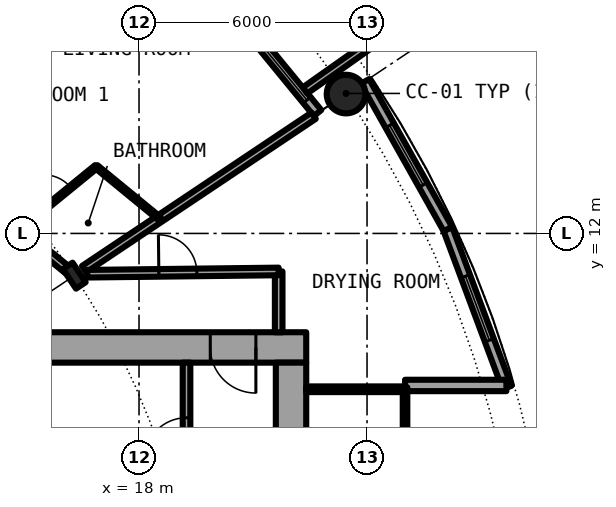
"""IFC4 building model, lengths in metres.
Left out: names, types, materials, properties, quantities, classifications, styles, units other than length and angle.
Written with IfcOpenShell. Run it as: python <this file> out.ifc"""

import sys

from ifc_helpers import new_model, si_unit, direction, frame, frame_2d, origin, origin_2d, place, context, subcontext, project, spatial, rectangle, hollow_circle, i_section, extrude, element, fill, save


model = new_model("IFC4")
c1 = context("Model", 3, precision=1e-05, world=origin(), true_north=direction((0.0, 1.0)))
c2 = subcontext(c1, "Body", "Model", "MODEL_VIEW")
j1 = project(units=[si_unit("LENGTHUNIT", "METRE"), si_unit("PLANEANGLEUNIT", "RADIAN")], contexts=[c1])
p1 = place(None, origin())
s1 = spatial("IfcSite", under=j1, at=p1, CompositionType="ELEMENT")
p2 = place(p1, origin())
s2 = spatial("IfcBuilding", under=s1, at=p2, CompositionType="ELEMENT")
p3 = place(p2, frame((0.0, 0.0, 47.2)))
s3 = spatial("IfcBuildingStorey", under=s2, at=p3, CompositionType="ELEMENT", Elevation=47.2)
p4 = place(p3, frame((23.448, 15.667, 0.0), z_axis=(0.0, 0.0, 1.0), x_axis=(1.0, 0.0, 0.0)))
e1 = element("IfcColumn", 1, at=p4, inside=s3, PredefinedType="COLUMN", context=c2, shape_type="SweptSolid", body=[
    extrude(hollow_circle(Radius=0.508, WallThickness=0.05, at=origin_2d()), origin(), (0.0, 0.0, 1.0), 3.05),
])
p5 = place(p3, frame((16.297, 10.889, 0.0), z_axis=(0.0, 0.0, 1.0), x_axis=(0.831469612303, 0.55557023302, 0.0)))
e2 = element("IfcColumn", 2, at=p5, inside=s3, PredefinedType="COLUMN", context=c2, shape_type="SweptSolid", body=[
    extrude(i_section(OverallWidth=0.305, OverallDepth=0.62, WebThickness=0.021, FlangeThickness=0.04, FilletRadius=0.027, at=origin_2d()), origin(), (0.0, 0.0, 1.0), 3.05),
])
p6 = place(p3, frame((22.699, 15.167, 0.0), z_axis=(0.0, 0.0, 1.0), x_axis=(-0.634382322723, 0.773019449054, 0.0)))
e3 = element("IfcWall", 3, at=p6, inside=s3, PredefinedType="SOLIDWALL", context=c2, shape_type="SweptSolid", body=[
    extrude(rectangle(XDim=5.352, YDim=0.25, at=frame_2d((2.676, 0.0))), origin(), (0.0, 0.0, 1.0), 2.7),
])
p7 = place(p6, frame((0.441, 0.0, 0.3)))
e4 = element("IfcOpeningElement", 4, at=p7, cuts=e3, PredefinedType="OPENING", context=c2, shape_type="SweptSolid", body=[
    extrude(rectangle(XDim=1.8, YDim=2.1, at=frame_2d((0.9, 1.05))), frame((0.0, 0.135, 0.0), z_axis=(0.0, -1.0, 0.0), x_axis=(1.0, 0.0, 0.0)), (0.0, 0.0, 1.0), 0.27),
])
p8 = place(p6, frame((3.51, 0.0, 0.0)))
e5 = element("IfcOpeningElement", 5, at=p8, cuts=e3, PredefinedType="OPENING", context=c2, shape_type="SweptSolid", body=[
    extrude(rectangle(XDim=1.0, YDim=2.2, at=frame_2d((0.5, 1.1))), frame((0.0, 0.135, 0.0), z_axis=(0.0, -1.0, 0.0), x_axis=(1.0, 0.0, 0.0)), (0.0, 0.0, 1.0), 0.27),
])
p9 = place(p3, frame((22.37, 15.765, -0.03), z_axis=(0.0, 0.0, 1.0), x_axis=(0.817256123454, 0.576274612209, 0.0)))
e6 = element("IfcWall", 6, at=p9, inside=s3, PredefinedType="SOLIDWALL", context=c2, shape_type="SweptSolid", body=[
    extrude(rectangle(XDim=2.933, YDim=0.2, at=frame_2d((1.466, 0.0))), origin(), (0.0, 0.0, 1.0), 2.73),
])
p10 = place(p3, frame((27.682, 7.945, 0.0), z_axis=(0.0, 0.0, 1.0), x_axis=(-0.349247811493, 0.937030397675, 0.0)))
e7 = element("IfcWall", 7, at=p10, inside=s3, PredefinedType="SOLIDWALL", context=c2, shape_type="SweptSolid", body=[
    extrude(rectangle(XDim=4.452, YDim=0.25, at=frame_2d((2.226, 0.0))), origin(), (0.0, 0.0, 1.0), 2.7),
])
p11 = place(p10, frame((1.327, 0.0, 0.3)))
e8 = element("IfcOpeningElement", 8, at=p11, cuts=e7, PredefinedType="OPENING", context=c2, shape_type="SweptSolid", body=[
    extrude(rectangle(XDim=1.8, YDim=2.1, at=frame_2d((0.9, 1.05))), frame((0.0, 0.135, 0.0), z_axis=(0.0, -1.0, 0.0), x_axis=(1.0, 0.0, 0.0)), (0.0, 0.0, 1.0), 0.27),
])
p12 = place(p3, frame((26.127, 12.117, 0.0), z_axis=(0.0, 0.0, 1.0), x_axis=(-0.489696356642, 0.871893042919, 0.0)))
e9 = element("IfcWall", 9, at=p12, inside=s3, PredefinedType="SOLIDWALL", context=c2, shape_type="SweptSolid", body=[
    extrude(rectangle(XDim=4.454, YDim=0.25, at=frame_2d((2.227, 0.0))), origin(), (0.0, 0.0, 1.0), 2.7),
])
p13 = place(p12, frame((1.327, 0.0, 0.3)))
e10 = element("IfcOpeningElement", 10, at=p13, cuts=e9, PredefinedType="OPENING", context=c2, shape_type="SweptSolid", body=[
    extrude(rectangle(XDim=1.8, YDim=2.1, at=frame_2d((0.9, 1.05))), frame((0.0, 0.135, 0.0), z_axis=(0.0, -1.0, 0.0), x_axis=(1.0, 0.0, 0.0)), (0.0, 0.0, 1.0), 0.27),
])
p14 = place(p3, frame((25.0, 8.0, 0.0), z_axis=(0.0, 0.0, 1.0), x_axis=(1.0, 0.0, 0.0)))
e11 = element("IfcWall", 11, at=p14, inside=s3, PredefinedType="SOLIDWALL", context=c2, shape_type="SweptSolid", body=[
    extrude(rectangle(XDim=2.667, YDim=0.3, at=frame_2d((1.333, 0.0))), origin(), (0.0, 0.0, 1.0), 2.7),
])
p15 = place(p3, frame((22.4, 9.0, 0.0), z_axis=(0.0, 0.0, 1.0), x_axis=(-1.0, 0.0, 0.0)))
e12 = element("IfcWall", 12, at=p15, inside=s3, PredefinedType="SHEAR", context=c2, shape_type="SweptSolid", body=[
    extrude(rectangle(XDim=14.2, YDim=0.8, at=frame_2d((7.1, 0.0))), origin(), (0.0, 0.0, 1.0), 3.05),
])
p16 = place(p15, frame((1.325, 0.0, 0.0)))
e13 = element("IfcOpeningElement", 13, at=p16, cuts=e12, PredefinedType="OPENING", context=c2, shape_type="SweptSolid", body=[
    extrude(rectangle(XDim=1.2, YDim=2.3, at=frame_2d((0.6, 1.15))), frame((0.0, 0.41, 0.0), z_axis=(0.0, -1.0, 0.0), x_axis=(1.0, 0.0, 0.0)), (0.0, 0.0, 1.0), 0.82),
])
p17 = place(p3, frame((22.0, 8.6, 0.0), z_axis=(0.0, 0.0, 1.0), x_axis=(0.0, -1.0, 0.0)))
e14 = element("IfcWall", 14, at=p17, inside=s3, PredefinedType="SHEAR", context=c2, shape_type="SweptSolid", body=[
    extrude(rectangle(XDim=17.2, YDim=0.8, at=frame_2d((8.6, 0.0))), origin(), (0.0, 0.0, 1.0), 3.05),
])
p18 = place(p17, frame((7.7, 0.0, 0.0)))
e15 = element("IfcOpeningElement", 15, at=p18, cuts=e14, PredefinedType="OPENING", context=c2, shape_type="SweptSolid", body=[
    extrude(rectangle(XDim=1.8, YDim=2.3, at=frame_2d((0.9, 1.15))), frame((0.0, 0.41, 0.0), z_axis=(0.0, -1.0, 0.0), x_axis=(1.0, 0.0, 0.0)), (0.0, 0.0, 1.0), 0.82),
])
p19 = place(p3, frame((19.25, 1.575, 0.0), z_axis=(0.0, 0.0, 1.0), x_axis=(0.0, 1.0, 0.0)))
e16 = element("IfcWall", 16, at=p19, inside=s3, PredefinedType="SOLIDWALL", context=c2, shape_type="SweptSolid", body=[
    extrude(rectangle(XDim=7.025, YDim=0.2, at=frame_2d((3.513, 0.0))), origin(), (0.0, 0.0, 1.0), 2.7),
])
p20 = place(p19, frame((4.475, 0.0, 0.0)))
e17 = element("IfcOpeningElement", 17, at=p20, cuts=e16, PredefinedType="OPENING", context=c2, shape_type="SweptSolid", body=[
    extrude(rectangle(XDim=1.1, YDim=2.3, at=frame_2d((0.55, 1.15))), frame((0.0, 0.11, 0.0), z_axis=(0.0, -1.0, 0.0), x_axis=(1.0, 0.0, 0.0)), (0.0, 0.0, 1.0), 0.22),
])
p21 = place(p3, frame((22.4, 7.9, 0.0), z_axis=(0.0, 0.0, 1.0), x_axis=(1.0, 0.0, 0.0)))
e18 = element("IfcWall", 18, at=p21, inside=s3, PredefinedType="PARTITIONING", context=c2, shape_type="SweptSolid", body=[
    extrude(rectangle(XDim=2.54, YDim=0.15, at=frame_2d((1.27, 0.0))), origin(), (0.0, 0.0, 1.0), 2.7),
])
p22 = place(p3, frame((25.0, -7.95, 0.0), z_axis=(0.0, 0.0, 1.0), x_axis=(0.0, 1.0, 0.0)))
e19 = element("IfcWall", 19, at=p22, inside=s3, PredefinedType="PARTITIONING", context=c2, shape_type="SweptSolid", body=[
    extrude(rectangle(XDim=15.9, YDim=0.12, at=frame_2d((7.95, 0.0))), origin(), (0.0, 0.0, 1.0), 2.7),
])
p23 = place(p22, frame((0.95, 0.0, 0.1)))
e20 = element("IfcOpeningElement", 20, at=p23, cuts=e19, PredefinedType="OPENING", context=c2, shape_type="SweptSolid", body=[
    extrude(rectangle(XDim=14.0, YDim=2.35, at=frame_2d((7.0, 1.175))), frame((0.0, 0.07, 0.0), z_axis=(0.0, -1.0, 0.0), x_axis=(1.0, 0.0, 0.0)), (0.0, 0.0, 1.0), 0.14),
])
p24 = place(p3, frame((21.675, 9.4, 0.0), z_axis=(0.0, 0.0, 1.0), x_axis=(0.0, 1.0, 0.0)))
e21 = element("IfcWall", 21, at=p24, inside=s3, PredefinedType="PARTITIONING", context=c2, shape_type="SweptSolid", body=[
    extrude(rectangle(XDim=1.6, YDim=0.2, at=frame_2d((0.8, 0.0))), origin(), (0.0, 0.0, 1.0), 2.7),
])
p25 = place(p3, frame((11.899, 14.499, 0.0), z_axis=(0.0, 0.0, 1.0), x_axis=(0.634396151441, 0.77300810024, 0.0)))
e22 = element("IfcWall", 22, at=p25, inside=s3, PredefinedType="PARTITIONING", context=c2, shape_type="SweptSolid", body=[
    extrude(rectangle(XDim=8.419, YDim=0.1, at=frame_2d((4.209, 0.0))), origin(), (0.0, 0.0, 1.0), 2.7),
])
p26 = place(p25, frame((0.84, 0.0, 0.0)))
e23 = element("IfcOpeningElement", 23, at=p26, cuts=e22, PredefinedType="OPENING", context=c2, shape_type="SweptSolid", body=[
    extrude(rectangle(XDim=0.9, YDim=2.3, at=frame_2d((0.45, 1.15))), frame((0.0, 0.06, 0.0), z_axis=(0.0, -1.0, 0.0), x_axis=(1.0, 0.0, 0.0)), (0.0, 0.0, 1.0), 0.12),
])
p27 = place(p25, frame((5.051, 0.0, 0.0)))
e24 = element("IfcOpeningElement", 24, at=p27, cuts=e22, PredefinedType="OPENING", context=c2, shape_type="SweptSolid", body=[
    extrude(rectangle(XDim=0.9, YDim=2.3, at=frame_2d((0.45, 1.15))), frame((0.0, 0.06, 0.0), z_axis=(0.0, -1.0, 0.0), x_axis=(1.0, 0.0, 0.0)), (0.0, 0.0, 1.0), 0.12),
])
p28 = place(p3, frame((14.831, 12.092, 0.0), z_axis=(0.0, 0.0, 1.0), x_axis=(0.774979608522, 0.631986239072, 0.0)))
e25 = element("IfcWall", 25, at=p28, inside=s3, PredefinedType="PARTITIONING", context=c2, shape_type="SweptSolid", body=[
    extrude(rectangle(XDim=2.636, YDim=0.1, at=frame_2d((1.318, 0.0))), origin(), (0.0, 0.0, 1.0), 2.7),
])
p29 = place(p28, frame((0.868, 0.0, 0.0)))
e26 = element("IfcOpeningElement", 26, at=p29, cuts=e25, PredefinedType="OPENING", context=c2, shape_type="SweptSolid", body=[
    extrude(rectangle(XDim=0.9, YDim=2.3, at=frame_2d((0.45, 1.15))), frame((0.0, 0.06, 0.0), z_axis=(0.0, -1.0, 0.0), x_axis=(1.0, 0.0, 0.0)), (0.0, 0.0, 1.0), 0.12),
])
p30 = place(p3, frame((16.555, 11.061, 0.0), z_axis=(0.0, 0.0, 1.0), x_axis=(0.831403467378, 0.55566921314, 0.0)))
e27 = element("IfcWall", 27, at=p30, inside=s3, PredefinedType="PARTITIONING", context=c2, shape_type="SweptSolid", body=[
    extrude(rectangle(XDim=7.265, YDim=0.2, at=frame_2d((3.632, 0.0))), origin(), (0.0, 0.0, 1.0), 2.7),
])
p31 = place(p3, frame((16.636, 10.94, 0.0), z_axis=(0.0, 0.0, 1.0), x_axis=(0.999928980998, 0.011917758204, 0.0)))
e28 = element("IfcWall", 28, at=p31, inside=s3, PredefinedType="PARTITIONING", context=c2, shape_type="SweptSolid", body=[
    extrude(rectangle(XDim=5.039, YDim=0.2, at=frame_2d((2.52, 0.0))), origin(), (0.0, 0.0, 1.0), 2.7),
])
p32 = place(p31, frame((1.886, 0.0, 0.0)))
e29 = element("IfcOpeningElement", 29, at=p32, cuts=e28, PredefinedType="OPENING", context=c2, shape_type="SweptSolid", body=[
    extrude(rectangle(XDim=1.0, YDim=2.3, at=frame_2d((0.5, 1.15))), frame((0.0, 0.11, 0.0), z_axis=(0.0, -1.0, 0.0), x_axis=(1.0, 0.0, 0.0)), (0.0, 0.0, 1.0), 0.22),
])
p33 = place(p3, frame((7.5, 18.108, 0.0), z_axis=(0.0, 0.0, 1.0), x_axis=(0.773041360816, -0.634355621452, 0.0)))
e30 = element("IfcWall", 30, at=p33, inside=s3, PredefinedType="PARTITIONING", context=c2, shape_type="SweptSolid", body=[
    extrude(rectangle(XDim=11.221, YDim=0.2, at=frame_2d((5.61, 0.0))), origin(), (0.0, 0.0, 1.0), 2.38),
])
p34 = place(p33, frame((7.083, 0.0, 0.0)))
e31 = element("IfcOpeningElement", 31, at=p34, cuts=e30, PredefinedType="OPENING", context=c2, shape_type="SweptSolid", body=[
    extrude(rectangle(XDim=1.0, YDim=2.3, at=frame_2d((0.5, 1.15))), frame((0.0, 0.11, 0.0), z_axis=(0.0, -1.0, 0.0), x_axis=(1.0, 0.0, 0.0)), (0.0, 0.0, 1.0), 0.22),
])
p35 = place(p3, frame((16.874, 13.758, 0.0), z_axis=(0.0, 0.0, 1.0), x_axis=(0.772948171844, -0.634469166818, 0.0)))
e32 = element("IfcWall", 32, at=p35, inside=s3, PredefinedType="PARTITIONING", context=c2, shape_type="SweptSolid", body=[
    extrude(rectangle(XDim=2.158, YDim=0.1, at=frame_2d((1.079, 0.0))), origin(), (0.0, 0.0, 1.0), 2.7),
])
p36 = place(p7, origin())
e33 = element("IfcWindow", 33, at=p36, inside=s3, PartitioningType="SINGLE_PANEL", PredefinedType="WINDOW", context=c2, shape_type="SweptSolid", body=[
    extrude(rectangle(XDim=1.8, YDim=2.1, at=frame_2d((0.9, 1.05))), frame((0.0, 0.03, 0.0), z_axis=(0.0, -1.0, 0.0), x_axis=(1.0, 0.0, 0.0)), (0.0, 0.0, 1.0), 0.06),
])
fill(e4, e33)
p37 = place(p11, origin())
e34 = element("IfcWindow", 34, at=p37, inside=s3, PartitioningType="SINGLE_PANEL", PredefinedType="WINDOW", context=c2, shape_type="SweptSolid", body=[
    extrude(rectangle(XDim=1.8, YDim=2.1, at=frame_2d((0.9, 1.05))), frame((0.0, 0.03, 0.0), z_axis=(0.0, -1.0, 0.0), x_axis=(1.0, 0.0, 0.0)), (0.0, 0.0, 1.0), 0.06),
])
fill(e8, e34)
p38 = place(p13, origin())
e35 = element("IfcWindow", 35, at=p38, inside=s3, PartitioningType="SINGLE_PANEL", PredefinedType="WINDOW", context=c2, shape_type="SweptSolid", body=[
    extrude(rectangle(XDim=1.8, YDim=2.1, at=frame_2d((0.9, 1.05))), frame((0.0, 0.03, 0.0), z_axis=(0.0, -1.0, 0.0), x_axis=(1.0, 0.0, 0.0)), (0.0, 0.0, 1.0), 0.06),
])
fill(e10, e35)
p39 = place(p20, origin())
e36 = element("IfcDoor", 36, at=p39, inside=s3, OperationType="SINGLE_SWING_LEFT", PredefinedType="DOOR", context=c2, shape_type="SweptSolid", body=[
    extrude(rectangle(XDim=1.1, YDim=2.3, at=frame_2d((0.55, 1.15))), frame((0.0, 0.025, 0.0), z_axis=(0.0, -1.0, 0.0), x_axis=(1.0, 0.0, 0.0)), (0.0, 0.0, 1.0), 0.05),
])
fill(e17, e36)
p40 = place(p16, origin())
e37 = element("IfcDoor", 37, at=p40, inside=s3, OperationType="SINGLE_SWING_RIGHT", PredefinedType="DOOR", context=c2, shape_type="SweptSolid", body=[
    extrude(rectangle(XDim=1.2, YDim=2.3, at=frame_2d((0.6, 1.15))), frame((0.0, 0.025, 0.0), z_axis=(0.0, -1.0, 0.0), x_axis=(1.0, 0.0, 0.0)), (0.0, 0.0, 1.0), 0.05),
])
fill(e13, e37)
p41 = place(p23, origin())
e38 = element("IfcWindow", 38, at=p41, inside=s3, PartitioningType="SINGLE_PANEL", PredefinedType="WINDOW", context=c2, shape_type="SweptSolid", body=[
    extrude(rectangle(XDim=14.0, YDim=2.35, at=frame_2d((7.0, 1.175))), frame((0.0, 0.03, 0.0), z_axis=(0.0, -1.0, 0.0), x_axis=(1.0, 0.0, 0.0)), (0.0, 0.0, 1.0), 0.06),
])
fill(e20, e38)
p42 = place(p29, origin())
e39 = element("IfcDoor", 39, at=p42, inside=s3, OperationType="SINGLE_SWING_RIGHT", PredefinedType="DOOR", context=c2, shape_type="SweptSolid", body=[
    extrude(rectangle(XDim=0.9, YDim=2.3, at=frame_2d((0.45, 1.15))), frame((0.0, 0.025, 0.0), z_axis=(0.0, -1.0, 0.0), x_axis=(1.0, 0.0, 0.0)), (0.0, 0.0, 1.0), 0.05),
])
fill(e26, e39)
p43 = place(p32, origin())
e40 = element("IfcDoor", 40, at=p43, inside=s3, OperationType="SINGLE_SWING_LEFT", PredefinedType="DOOR", context=c2, shape_type="SweptSolid", body=[
    extrude(rectangle(XDim=1.0, YDim=2.3, at=frame_2d((0.5, 1.15))), frame((0.0, 0.025, 0.0), z_axis=(0.0, -1.0, 0.0), x_axis=(1.0, 0.0, 0.0)), (0.0, 0.0, 1.0), 0.05),
])
fill(e29, e40)
save(model, sys.argv[1])
